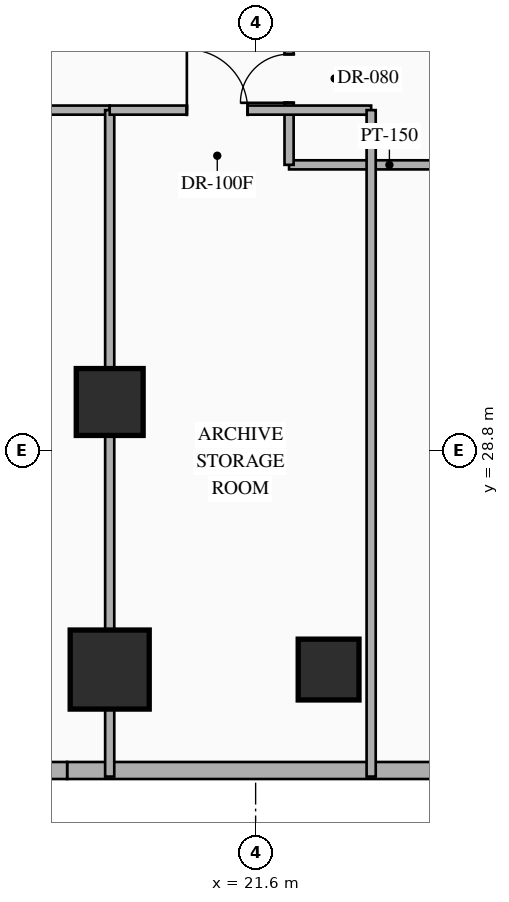
"""IFC4 building model, lengths in metres.
Left out: names, types, materials, properties, quantities, classifications, styles, units other than length and angle.
Written with IfcOpenShell. Run it as: python <this file> out.ifc"""

import sys

from ifc_helpers import new_model, si_unit, direction, frame, frame_2d, origin, origin_2d, place, context, subcontext, project, spatial, rectangle, hollow_rectangle, extrude, element, fill, save


model = new_model("IFC4")
c1 = context("Model", 3, precision=1e-05, world=origin(), true_north=direction((0.0, 1.0)))
c2 = subcontext(c1, "Body", "Model", "MODEL_VIEW")
j1 = project(units=[si_unit("LENGTHUNIT", "METRE"), si_unit("PLANEANGLEUNIT", "RADIAN")], contexts=[c1])
p1 = place(None, origin())
s1 = spatial("IfcSite", under=j1, at=p1, CompositionType="ELEMENT")
p2 = place(p1, origin())
s2 = spatial("IfcBuilding", under=s1, at=p2, CompositionType="ELEMENT")
p3 = place(p2, frame((0.0, 0.0, 10.8)))
s3 = spatial("IfcBuildingStorey", under=s2, at=p3, CompositionType="ELEMENT", Elevation=10.8)
p4 = place(p3, frame((19.2, 25.2, 0.0), z_axis=(0.0, 0.0, 1.0), x_axis=(1.0, 0.0, 0.0)))
e1 = element("IfcColumn", 1, at=p4, inside=s3, PredefinedType="COLUMN", context=c2, shape_type="SweptSolid", body=[
    extrude(rectangle(XDim=1.3, YDim=1.3, at=origin_2d()), origin(), (0.0, 0.0, 1.0), 5.4),
])
p5 = place(p3, frame((19.2, 29.6, 0.0), z_axis=(0.0, 0.0, 1.0), x_axis=(1.0, 0.0, 0.0)))
e2 = element("IfcColumn", 2, at=p5, inside=s3, PredefinedType="COLUMN", context=c2, shape_type="SweptSolid", body=[
    extrude(hollow_rectangle(XDim=1.1, YDim=1.1, WallThickness=0.04, at=origin_2d()), origin(), (0.0, 0.0, 1.0), 5.4),
])
p6 = place(p3, frame((22.8, 25.2, 0.0), z_axis=(0.0, 0.0, 1.0), x_axis=(1.0, 0.0, 0.0)))
e3 = element("IfcColumn", 3, at=p6, inside=s3, PredefinedType="COLUMN", context=c2, shape_type="SweptSolid", body=[
    extrude(hollow_rectangle(XDim=1.0, YDim=1.0, WallThickness=0.038, at=origin_2d()), origin(), (0.0, 0.0, 1.0), 5.4),
])
p7 = place(p3, frame((25.247, 23.54, 0.0), z_axis=(0.0, 0.0, 1.0), x_axis=(-1.0, 0.0, 0.0)))
e4 = element("IfcWall", 4, at=p7, inside=s3, PredefinedType="STANDARD", context=c2, shape_type="SweptSolid", body=[
    extrude(rectangle(XDim=6.747, YDim=0.28, at=frame_2d((3.374, 0.0))), origin(), (0.0, 0.0, 1.0), 5.1),
])
p8 = place(p3, frame((18.5, 23.54, 0.0), z_axis=(0.0, 0.0, 1.0), x_axis=(-1.0, 0.0, 0.0)))
e5 = element("IfcWall", 5, at=p8, inside=s3, PredefinedType="STANDARD", context=c2, shape_type="SweptSolid", body=[
    extrude(rectangle(XDim=9.6, YDim=0.28, at=frame_2d((4.8, 0.0))), origin(), (0.0, 0.0, 1.0), 5.1),
])
p9 = place(p3, frame((22.15, 33.5, 0.0), z_axis=(0.0, 0.0, 1.0), x_axis=(1.0, 0.0, 0.0)))
e6 = element("IfcWall", 6, at=p9, inside=s3, PredefinedType="PARTITIONING", context=c2, shape_type="SweptSolid", body=[
    extrude(rectangle(XDim=3.3, YDim=0.15, at=frame_2d((1.65, 0.0))), origin(), (0.0, 0.0, 1.0), 5.1),
])
p10 = place(p3, frame((22.15, 33.5, 0.0), z_axis=(0.0, 0.0, 1.0), x_axis=(0.0, 1.0, 0.0)))
e7 = element("IfcWall", 7, at=p10, inside=s3, PredefinedType="PARTITIONING", context=c2, shape_type="SweptSolid", body=[
    extrude(rectangle(XDim=2.2, YDim=0.15, at=frame_2d((1.1, 0.0))), origin(), (0.0, 0.0, 1.0), 5.1),
])
p11 = place(p10, frame((1.02, 0.0, 0.0)))
e8 = element("IfcOpeningElement", 8, at=p11, cuts=e7, PredefinedType="OPENING", context=c2, shape_type="SweptSolid", body=[
    extrude(rectangle(XDim=0.8, YDim=2.06, at=frame_2d((0.4, 1.03))), frame((0.0, 0.085, 0.0), z_axis=(0.0, -1.0, 0.0), x_axis=(1.0, 0.0, 0.0)), (0.0, 0.0, 1.0), 0.17),
])
p12 = place(p3, frame((8.4, 34.4, 0.0), z_axis=(0.0, 0.0, 1.0), x_axis=(1.0, 0.0, 0.0)))
e9 = element("IfcWall", 9, at=p12, inside=s3, PredefinedType="PARTITIONING", context=c2, shape_type="SweptSolid", body=[
    extrude(rectangle(XDim=10.8, YDim=0.15, at=frame_2d((5.4, 0.0))), origin(), (0.0, 0.0, 1.0), 5.1),
])
p13 = place(p12, frame((4.5, 0.0, 0.0)))
e10 = element("IfcOpeningElement", 10, at=p13, cuts=e9, PredefinedType="OPENING", context=c2, shape_type="SweptSolid", body=[
    extrude(rectangle(XDim=1.8, YDim=2.35, at=frame_2d((0.9, 1.175))), frame((0.0, 0.085, 0.0), z_axis=(0.0, -1.0, 0.0), x_axis=(1.0, 0.0, 0.0)), (0.0, 0.0, 1.0), 0.17),
])
p14 = place(p3, frame((19.2, 23.44, 0.0), z_axis=(0.0, 0.0, 1.0), x_axis=(0.0, 1.0, 0.0)))
e11 = element("IfcWall", 11, at=p14, inside=s3, PredefinedType="PARTITIONING", context=c2, shape_type="SweptSolid", body=[
    extrude(rectangle(XDim=10.96, YDim=0.15, at=frame_2d((5.48, 0.0))), origin(), (0.0, 0.0, 1.0), 3.895),
])
p15 = place(p3, frame((19.2, 34.4, 0.0), z_axis=(0.0, 0.0, 1.0), x_axis=(1.0, 0.0, 0.0)))
e12 = element("IfcWall", 12, at=p15, inside=s3, PredefinedType="PARTITIONING", context=c2, shape_type="SweptSolid", body=[
    extrude(rectangle(XDim=4.3, YDim=0.15, at=frame_2d((2.15, 0.0))), origin(), (0.0, 0.0, 1.0), 5.1),
])
p16 = place(p15, frame((1.269, 0.0, 0.0)))
e13 = element("IfcOpeningElement", 13, at=p16, cuts=e12, PredefinedType="OPENING", context=c2, shape_type="SweptSolid", body=[
    extrude(rectangle(XDim=1.0, YDim=2.2, at=frame_2d((0.5, 1.1))), frame((0.0, 0.085, 0.0), z_axis=(0.0, -1.0, 0.0), x_axis=(1.0, 0.0, 0.0)), (0.0, 0.0, 1.0), 0.17),
])
p17 = place(p3, frame((23.5, 23.44, 0.0), z_axis=(0.0, 0.0, 1.0), x_axis=(0.0, 1.0, 0.0)))
e14 = element("IfcWall", 14, at=p17, inside=s3, PredefinedType="PARTITIONING", context=c2, shape_type="SweptSolid", body=[
    extrude(rectangle(XDim=10.96, YDim=0.15, at=frame_2d((5.48, 0.0))), origin(), (0.0, 0.0, 1.0), 5.1),
])
p18 = place(p11, origin())
e15 = element("IfcDoor", 15, at=p18, inside=s3, OperationType="SINGLE_SWING_LEFT", PredefinedType="DOOR", context=c2, shape_type="SweptSolid", body=[
    extrude(rectangle(XDim=0.8, YDim=2.06, at=frame_2d((0.4, 1.03))), frame((0.0, 0.025, 0.0), z_axis=(0.0, -1.0, 0.0), x_axis=(1.0, 0.0, 0.0)), (0.0, 0.0, 1.0), 0.05),
])
fill(e8, e15)
p19 = place(p16, origin())
e16 = element("IfcDoor", 16, at=p19, inside=s3, OperationType="SINGLE_SWING_LEFT", PredefinedType="DOOR", context=c2, shape_type="SweptSolid", body=[
    extrude(rectangle(XDim=1.0, YDim=2.2, at=frame_2d((0.5, 1.1))), frame((0.0, 0.025, 0.0), z_axis=(0.0, -1.0, 0.0), x_axis=(1.0, 0.0, 0.0)), (0.0, 0.0, 1.0), 0.05),
])
fill(e13, e16)
save(model, sys.argv[1])
